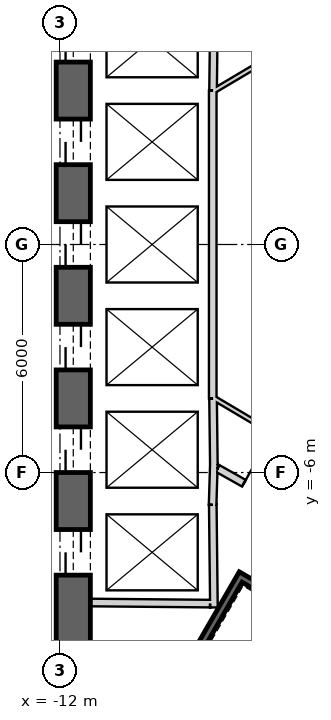
"""IFC4 building model, lengths in metres.
Left out: names, types, materials, properties, quantities, classifications, styles, units other than length and angle.
Written with IfcOpenShell. Run it as: python <this file> out.ifc"""

import sys

from ifc_helpers import new_model, si_unit, direction, frame, frame_2d, origin, place, context, subcontext, project, spatial, rectangle, extrude, element, fill, save


model = new_model("IFC4")
c1 = context("Model", 3, precision=1e-05, world=origin(), true_north=direction((0.0, 1.0)))
c2 = subcontext(c1, "Body", "Model", "MODEL_VIEW")
j1 = project(units=[si_unit("LENGTHUNIT", "METRE"), si_unit("PLANEANGLEUNIT", "RADIAN")], contexts=[c1])
p1 = place(None, origin())
s1 = spatial("IfcSite", under=j1, at=p1, CompositionType="ELEMENT")
p2 = place(p1, origin())
s2 = spatial("IfcBuilding", under=s1, at=p2, CompositionType="ELEMENT")
p3 = place(p2, frame((0.0, 0.0, 70.1)))
s3 = spatial("IfcBuildingStorey", under=s2, at=p3, CompositionType="ELEMENT", Elevation=70.1)
p4 = place(p3, frame((19.475, 2.208, 0.0), z_axis=(0.0, 0.0, 1.0), x_axis=(-0.866028369851, 0.499994862586, 0.0)))
e1 = element("IfcWall", 1, at=p4, inside=s3, PredefinedType="SHEAR", context=c2, shape_type="SweptSolid", body=[
    extrude(rectangle(XDim=31.523, YDim=0.9, at=frame_2d((15.762, 0.0))), origin(), (0.0, 0.0, 1.0), 4.1),
])
p5 = place(p4, frame((7.062, 0.0, 0.0)))
e2 = element("IfcOpeningElement", 2, at=p5, cuts=e1, PredefinedType="OPENING", context=c2, shape_type="SweptSolid", body=[
    extrude(rectangle(XDim=1.2, YDim=2.4, at=frame_2d((0.6, 1.2))), frame((0.0, 0.46, 0.0), z_axis=(0.0, -1.0, 0.0), x_axis=(1.0, 0.0, 0.0)), (0.0, 0.0, 1.0), 0.92),
])
p6 = place(p4, frame((9.762, 0.0, 0.0)))
e3 = element("IfcOpeningElement", 3, at=p6, cuts=e1, PredefinedType="OPENING", context=c2, shape_type="SweptSolid", body=[
    extrude(rectangle(XDim=1.2, YDim=2.4, at=frame_2d((0.6, 1.2))), frame((0.0, 0.46, 0.0), z_axis=(0.0, -1.0, 0.0), x_axis=(1.0, 0.0, 0.0)), (0.0, 0.0, 1.0), 0.92),
])
p7 = place(p4, frame((12.462, 0.0, 0.0)))
e4 = element("IfcOpeningElement", 4, at=p7, cuts=e1, PredefinedType="OPENING", context=c2, shape_type="SweptSolid", body=[
    extrude(rectangle(XDim=1.2, YDim=2.4, at=frame_2d((0.6, 1.2))), frame((0.0, 0.46, 0.0), z_axis=(0.0, -1.0, 0.0), x_axis=(1.0, 0.0, 0.0)), (0.0, 0.0, 1.0), 0.92),
])
p8 = place(p4, frame((15.162, 0.0, 0.0)))
e5 = element("IfcOpeningElement", 5, at=p8, cuts=e1, PredefinedType="OPENING", context=c2, shape_type="SweptSolid", body=[
    extrude(rectangle(XDim=1.2, YDim=2.4, at=frame_2d((0.6, 1.2))), frame((0.0, 0.46, 0.0), z_axis=(0.0, -1.0, 0.0), x_axis=(1.0, 0.0, 0.0)), (0.0, 0.0, 1.0), 0.92),
])
p9 = place(p4, frame((17.862, 0.0, 0.0)))
e6 = element("IfcOpeningElement", 6, at=p9, cuts=e1, PredefinedType="OPENING", context=c2, shape_type="SweptSolid", body=[
    extrude(rectangle(XDim=1.2, YDim=2.4, at=frame_2d((0.6, 1.2))), frame((0.0, 0.46, 0.0), z_axis=(0.0, -1.0, 0.0), x_axis=(1.0, 0.0, 0.0)), (0.0, 0.0, 1.0), 0.92),
])
p10 = place(p4, frame((20.562, 0.0, 0.0)))
e7 = element("IfcOpeningElement", 7, at=p10, cuts=e1, PredefinedType="OPENING", context=c2, shape_type="SweptSolid", body=[
    extrude(rectangle(XDim=1.2, YDim=2.4, at=frame_2d((0.6, 1.2))), frame((0.0, 0.46, 0.0), z_axis=(0.0, -1.0, 0.0), x_axis=(1.0, 0.0, 0.0)), (0.0, 0.0, 1.0), 0.92),
])
p11 = place(p4, frame((23.262, 0.0, 0.0)))
e8 = element("IfcOpeningElement", 8, at=p11, cuts=e1, PredefinedType="OPENING", context=c2, shape_type="SweptSolid", body=[
    extrude(rectangle(XDim=1.2, YDim=2.4, at=frame_2d((0.6, 1.2))), frame((0.0, 0.46, 0.0), z_axis=(0.0, -1.0, 0.0), x_axis=(1.0, 0.0, 0.0)), (0.0, 0.0, 1.0), 0.92),
])
p12 = place(p4, frame((3.612, 0.0, 0.0)))
e9 = element("IfcOpeningElement", 9, at=p12, cuts=e1, PredefinedType="OPENING", context=c2, shape_type="SweptSolid", body=[
    extrude(rectangle(XDim=1.2, YDim=2.4, at=frame_2d((0.6, 1.2))), frame((0.0, 0.46, 0.0), z_axis=(0.0, -1.0, 0.0), x_axis=(1.0, 0.0, 0.0)), (0.0, 0.0, 1.0), 0.92),
])
p13 = place(p4, frame((26.712, 0.0, 0.0)))
e10 = element("IfcOpeningElement", 10, at=p13, cuts=e1, PredefinedType="OPENING", context=c2, shape_type="SweptSolid", body=[
    extrude(rectangle(XDim=1.2, YDim=2.4, at=frame_2d((0.6, 1.2))), frame((0.0, 0.46, 0.0), z_axis=(0.0, -1.0, 0.0), x_axis=(1.0, 0.0, 0.0)), (0.0, 0.0, 1.0), 0.92),
])
p14 = place(p3, frame((-11.65, 15.762, 0.0), z_axis=(0.0, 0.0, 1.0), x_axis=(0.0, -1.0, 0.0)))
e11 = element("IfcWall", 11, at=p14, inside=s3, PredefinedType="SHEAR", context=c2, shape_type="SweptSolid", body=[
    extrude(rectangle(XDim=31.523, YDim=0.9, at=frame_2d((15.762, 0.0))), origin(), (0.0, 0.0, 1.0), 4.1),
])
p15 = place(p14, frame((7.062, 0.0, 0.0)))
e12 = element("IfcOpeningElement", 12, at=p15, cuts=e11, PredefinedType="OPENING", context=c2, shape_type="SweptSolid", body=[
    extrude(rectangle(XDim=1.2, YDim=2.4, at=frame_2d((0.6, 1.2))), frame((0.0, 0.46, 0.0), z_axis=(0.0, -1.0, 0.0), x_axis=(1.0, 0.0, 0.0)), (0.0, 0.0, 1.0), 0.92),
])
p16 = place(p14, frame((9.762, 0.0, 0.0)))
e13 = element("IfcOpeningElement", 13, at=p16, cuts=e11, PredefinedType="OPENING", context=c2, shape_type="SweptSolid", body=[
    extrude(rectangle(XDim=1.2, YDim=2.4, at=frame_2d((0.6, 1.2))), frame((0.0, 0.46, 0.0), z_axis=(0.0, -1.0, 0.0), x_axis=(1.0, 0.0, 0.0)), (0.0, 0.0, 1.0), 0.92),
])
p17 = place(p14, frame((12.462, 0.0, 0.0)))
e14 = element("IfcOpeningElement", 14, at=p17, cuts=e11, PredefinedType="OPENING", context=c2, shape_type="SweptSolid", body=[
    extrude(rectangle(XDim=1.2, YDim=2.4, at=frame_2d((0.6, 1.2))), frame((0.0, 0.46, 0.0), z_axis=(0.0, -1.0, 0.0), x_axis=(1.0, 0.0, 0.0)), (0.0, 0.0, 1.0), 0.92),
])
p18 = place(p14, frame((15.162, 0.0, 0.0)))
e15 = element("IfcOpeningElement", 15, at=p18, cuts=e11, PredefinedType="OPENING", context=c2, shape_type="SweptSolid", body=[
    extrude(rectangle(XDim=1.2, YDim=2.4, at=frame_2d((0.6, 1.2))), frame((0.0, 0.46, 0.0), z_axis=(0.0, -1.0, 0.0), x_axis=(1.0, 0.0, 0.0)), (0.0, 0.0, 1.0), 0.92),
])
p19 = place(p14, frame((17.862, 0.0, 0.0)))
e16 = element("IfcOpeningElement", 16, at=p19, cuts=e11, PredefinedType="OPENING", context=c2, shape_type="SweptSolid", body=[
    extrude(rectangle(XDim=1.2, YDim=2.4, at=frame_2d((0.6, 1.2))), frame((0.0, 0.46, 0.0), z_axis=(0.0, -1.0, 0.0), x_axis=(1.0, 0.0, 0.0)), (0.0, 0.0, 1.0), 0.92),
])
p20 = place(p14, frame((20.562, 0.0, 0.0)))
e17 = element("IfcOpeningElement", 17, at=p20, cuts=e11, PredefinedType="OPENING", context=c2, shape_type="SweptSolid", body=[
    extrude(rectangle(XDim=1.2, YDim=2.4, at=frame_2d((0.6, 1.2))), frame((0.0, 0.46, 0.0), z_axis=(0.0, -1.0, 0.0), x_axis=(1.0, 0.0, 0.0)), (0.0, 0.0, 1.0), 0.92),
])
p21 = place(p14, frame((23.262, 0.0, 0.0)))
e18 = element("IfcOpeningElement", 18, at=p21, cuts=e11, PredefinedType="OPENING", context=c2, shape_type="SweptSolid", body=[
    extrude(rectangle(XDim=1.2, YDim=2.4, at=frame_2d((0.6, 1.2))), frame((0.0, 0.46, 0.0), z_axis=(0.0, -1.0, 0.0), x_axis=(1.0, 0.0, 0.0)), (0.0, 0.0, 1.0), 0.92),
])
p22 = place(p14, frame((3.612, 0.0, 0.0)))
e19 = element("IfcOpeningElement", 19, at=p22, cuts=e11, PredefinedType="OPENING", context=c2, shape_type="SweptSolid", body=[
    extrude(rectangle(XDim=1.2, YDim=2.4, at=frame_2d((0.6, 1.2))), frame((0.0, 0.46, 0.0), z_axis=(0.0, -1.0, 0.0), x_axis=(1.0, 0.0, 0.0)), (0.0, 0.0, 1.0), 0.92),
])
p23 = place(p14, frame((26.712, 0.0, 0.0)))
e20 = element("IfcOpeningElement", 20, at=p23, cuts=e11, PredefinedType="OPENING", context=c2, shape_type="SweptSolid", body=[
    extrude(rectangle(XDim=1.2, YDim=2.4, at=frame_2d((0.6, 1.2))), frame((0.0, 0.46, 0.0), z_axis=(0.0, -1.0, 0.0), x_axis=(1.0, 0.0, 0.0)), (0.0, 0.0, 1.0), 0.92),
])
p24 = place(p3, frame((-7.825, -17.97, 0.0), z_axis=(0.0, 0.0, 1.0), x_axis=(0.866028369851, 0.499994862586, 0.0)))
e21 = element("IfcWall", 21, at=p24, inside=s3, PredefinedType="SHEAR", context=c2, shape_type="SweptSolid", body=[
    extrude(rectangle(XDim=31.523, YDim=0.9, at=frame_2d((15.762, 0.0))), origin(), (0.0, 0.0, 1.0), 4.1),
])
p25 = place(p24, frame((7.062, 0.0, 0.0)))
e22 = element("IfcOpeningElement", 22, at=p25, cuts=e21, PredefinedType="OPENING", context=c2, shape_type="SweptSolid", body=[
    extrude(rectangle(XDim=1.2, YDim=2.4, at=frame_2d((0.6, 1.2))), frame((0.0, 0.46, 0.0), z_axis=(0.0, -1.0, 0.0), x_axis=(1.0, 0.0, 0.0)), (0.0, 0.0, 1.0), 0.92),
])
p26 = place(p24, frame((9.762, 0.0, 0.0)))
e23 = element("IfcOpeningElement", 23, at=p26, cuts=e21, PredefinedType="OPENING", context=c2, shape_type="SweptSolid", body=[
    extrude(rectangle(XDim=1.2, YDim=2.4, at=frame_2d((0.6, 1.2))), frame((0.0, 0.46, 0.0), z_axis=(0.0, -1.0, 0.0), x_axis=(1.0, 0.0, 0.0)), (0.0, 0.0, 1.0), 0.92),
])
p27 = place(p24, frame((12.462, 0.0, 0.0)))
e24 = element("IfcOpeningElement", 24, at=p27, cuts=e21, PredefinedType="OPENING", context=c2, shape_type="SweptSolid", body=[
    extrude(rectangle(XDim=1.2, YDim=2.4, at=frame_2d((0.6, 1.2))), frame((0.0, 0.46, 0.0), z_axis=(0.0, -1.0, 0.0), x_axis=(1.0, 0.0, 0.0)), (0.0, 0.0, 1.0), 0.92),
])
p28 = place(p24, frame((15.162, 0.0, 0.0)))
e25 = element("IfcOpeningElement", 25, at=p28, cuts=e21, PredefinedType="OPENING", context=c2, shape_type="SweptSolid", body=[
    extrude(rectangle(XDim=1.2, YDim=2.4, at=frame_2d((0.6, 1.2))), frame((0.0, 0.46, 0.0), z_axis=(0.0, -1.0, 0.0), x_axis=(1.0, 0.0, 0.0)), (0.0, 0.0, 1.0), 0.92),
])
p29 = place(p24, frame((17.862, 0.0, 0.0)))
e26 = element("IfcOpeningElement", 26, at=p29, cuts=e21, PredefinedType="OPENING", context=c2, shape_type="SweptSolid", body=[
    extrude(rectangle(XDim=1.2, YDim=2.4, at=frame_2d((0.6, 1.2))), frame((0.0, 0.46, 0.0), z_axis=(0.0, -1.0, 0.0), x_axis=(1.0, 0.0, 0.0)), (0.0, 0.0, 1.0), 0.92),
])
p30 = place(p24, frame((20.562, 0.0, 0.0)))
e27 = element("IfcOpeningElement", 27, at=p30, cuts=e21, PredefinedType="OPENING", context=c2, shape_type="SweptSolid", body=[
    extrude(rectangle(XDim=1.2, YDim=2.4, at=frame_2d((0.6, 1.2))), frame((0.0, 0.46, 0.0), z_axis=(0.0, -1.0, 0.0), x_axis=(1.0, 0.0, 0.0)), (0.0, 0.0, 1.0), 0.92),
])
p31 = place(p24, frame((26.712, 0.0, 0.0)))
e28 = element("IfcOpeningElement", 28, at=p31, cuts=e21, PredefinedType="OPENING", context=c2, shape_type="SweptSolid", body=[
    extrude(rectangle(XDim=1.2, YDim=2.4, at=frame_2d((0.6, 1.2))), frame((0.0, 0.46, 0.0), z_axis=(0.0, -1.0, 0.0), x_axis=(1.0, 0.0, 0.0)), (0.0, 0.0, 1.0), 0.92),
])
p32 = place(p24, frame((3.612, 0.0, 0.0)))
e29 = element("IfcOpeningElement", 29, at=p32, cuts=e21, PredefinedType="OPENING", context=c2, shape_type="SweptSolid", body=[
    extrude(rectangle(XDim=1.2, YDim=2.4, at=frame_2d((0.6, 1.2))), frame((0.0, 0.46, 0.0), z_axis=(0.0, -1.0, 0.0), x_axis=(1.0, 0.0, 0.0)), (0.0, 0.0, 1.0), 0.92),
])
p33 = place(p3, frame((-7.949, 5.895, 0.0), z_axis=(0.0, 0.0, 1.0), x_axis=(-0.012042535896, -0.999927486035, 0.0)))
e30 = element("IfcWall", 30, at=p33, inside=s3, PredefinedType="PLUMBINGWALL", context=c2, shape_type="SweptSolid", body=[
    extrude(rectangle(XDim=1.845, YDim=0.2, at=frame_2d((0.922, 0.0))), origin(), (0.0, 0.0, 1.0), 3.8),
])
p34 = place(p3, frame((-7.98, 4.05, 0.0), z_axis=(0.0, 0.0, 1.0), x_axis=(0.0, -1.0, 0.0)))
e31 = element("IfcWall", 31, at=p34, inside=s3, PredefinedType="PLUMBINGWALL", context=c2, shape_type="SweptSolid", body=[
    extrude(rectangle(XDim=8.1, YDim=0.2, at=frame_2d((4.05, 0.0))), origin(), (0.0, 0.0, 1.0), 3.8),
])
p35 = place(p3, frame((-7.95, -5.772, 0.0), z_axis=(0.0, 0.0, 1.0), x_axis=(-0.030803413295, -0.999525462272, 0.0)))
e32 = element("IfcWall", 32, at=p35, inside=s3, PredefinedType="PLUMBINGWALL", context=c2, shape_type="SweptSolid", body=[
    extrude(rectangle(XDim=1.078, YDim=0.2, at=frame_2d((0.539, 0.0))), origin(), (0.0, 0.0, 1.0), 3.8),
])
p36 = place(p3, frame((-7.971, -4.05, 0.0), z_axis=(0.0, 0.0, 1.0), x_axis=(0.012042535896, -0.999927486035, 0.0)))
e33 = element("IfcWall", 33, at=p36, inside=s3, PredefinedType="PLUMBINGWALL", context=c2, shape_type="SweptSolid", body=[
    extrude(rectangle(XDim=1.845, YDim=0.2, at=frame_2d((0.922, 0.0))), origin(), (0.0, 0.0, 1.0), 3.8),
])
p37 = place(p3, frame((-7.979, -6.85, 0.0), z_axis=(0.0, 0.0, 1.0), x_axis=(0.011121475088, -0.999938154483, 0.0)))
e34 = element("IfcWall", 34, at=p37, inside=s3, PredefinedType="PLUMBINGWALL", context=c2, shape_type="SweptSolid", body=[
    extrude(rectangle(XDim=2.7, YDim=0.2, at=frame_2d((1.35, 0.0))), origin(), (0.0, 0.0, 1.0), 3.8),
])
p38 = place(p3, frame((-8.05, -9.449, 0.0), z_axis=(0.0, 0.0, 1.0), x_axis=(-0.999957467379, 0.009222983926, 0.0)))
e35 = element("IfcWall", 35, at=p38, inside=s3, PredefinedType="PLUMBINGWALL", context=c2, shape_type="SweptSolid", body=[
    extrude(rectangle(XDim=3.15, YDim=0.2, at=frame_2d((1.575, 0.0))), origin(), (0.0, 0.0, 1.0), 3.8),
])
p39 = place(p3, frame((-7.196, -8.663, -0.3), z_axis=(0.0, 0.0, 1.0), x_axis=(-0.499997992926, -0.866026562566, 0.0)))
e36 = element("IfcWall", 36, at=p39, inside=s3, PredefinedType="SHEAR", context=c2, shape_type="SweptSolid", body=[
    extrude(rectangle(XDim=7.9, YDim=0.2, at=frame_2d((3.95, 0.0))), origin(), (0.0, 0.0, 1.0), 4.1),
])
p40 = place(p3, frame((-4.041, -10.599, -0.3), z_axis=(0.0, 0.0, 1.0), x_axis=(-0.866047807691, 0.499961193289, 0.0)))
e37 = element("IfcWall", 37, at=p40, inside=s3, PredefinedType="SHEAR", context=c2, shape_type="SweptSolid", body=[
    extrude(rectangle(XDim=3.6, YDim=0.2, at=frame_2d((1.8, 0.0))), origin(), (0.0, 0.0, 1.0), 4.1),
])
p41 = place(p40, frame((1.25, 0.0, 0.3)))
e38 = element("IfcOpeningElement", 38, at=p41, cuts=e37, PredefinedType="OPENING", context=c2, shape_type="SweptSolid", body=[
    extrude(rectangle(XDim=1.1, YDim=2.1, at=frame_2d((0.55, 1.05))), frame((0.0, 0.11, 0.0), z_axis=(0.0, -1.0, 0.0), x_axis=(1.0, 0.0, 0.0)), (0.0, 0.0, 1.0), 0.22),
])
p42 = place(p3, frame((-7.849, -5.894, 0.0), z_axis=(0.0, 0.0, 1.0), x_axis=(0.871363259478, -0.490638431059, 0.0)))
e39 = element("IfcWall", 39, at=p42, inside=s3, PredefinedType="PARTITIONING", context=c2, shape_type="SweptSolid", body=[
    extrude(rectangle(XDim=2.581, YDim=0.2, at=frame_2d((1.291, 0.0))), origin(), (0.0, 0.0, 1.0), 3.8),
])
p43 = place(p42, frame((0.791, 0.0, 0.0)))
e40 = element("IfcOpeningElement", 40, at=p43, cuts=e39, PredefinedType="OPENING", context=c2, shape_type="SweptSolid", body=[
    extrude(rectangle(XDim=1.0, YDim=2.1, at=frame_2d((0.5, 1.05))), frame((0.0, 0.11, 0.0), z_axis=(0.0, -1.0, 0.0), x_axis=(1.0, 0.0, 0.0)), (0.0, 0.0, 1.0), 0.22),
])
p44 = place(p3, frame((-6.037, 5.176, 0.0), z_axis=(0.0, 0.0, 1.0), x_axis=(-0.860106072674, -0.510115225953, 0.0)))
e41 = element("IfcWall", 41, at=p44, inside=s3, PredefinedType="PARTITIONING", context=c2, shape_type="SweptSolid", body=[
    extrude(rectangle(XDim=2.225, YDim=0.12, at=frame_2d((1.112, 0.0))), origin(), (0.0, 0.0, 1.0), 3.8),
])
p45 = place(p3, frame((-7.95, -4.041, 0.0), z_axis=(0.0, 0.0, 1.0), x_axis=(0.860112457103, -0.510104461004, 0.0)))
e42 = element("IfcWall", 42, at=p45, inside=s3, PredefinedType="PARTITIONING", context=c2, shape_type="SweptSolid", body=[
    extrude(rectangle(XDim=2.104, YDim=0.12, at=frame_2d((1.052, 0.0))), origin(), (0.0, 0.0, 1.0), 3.8),
])
p46 = place(p43, origin())
e43 = element("IfcDoor", 43, at=p46, inside=s3, OperationType="SINGLE_SWING_LEFT", PredefinedType="USERDEFINED", context=c2, shape_type="SweptSolid", body=[
    extrude(rectangle(XDim=1.0, YDim=2.1, at=frame_2d((0.5, 1.05))), frame((0.0, 0.025, 0.0), z_axis=(0.0, -1.0, 0.0), x_axis=(1.0, 0.0, 0.0)), (0.0, 0.0, 1.0), 0.05),
])
fill(e40, e43)
p47 = place(p16, origin())
e44 = element("IfcDoor", 44, at=p47, inside=s3, OperationType="SLIDING_TO_LEFT", PredefinedType="USERDEFINED", context=c2, shape_type="SweptSolid", body=[
    extrude(rectangle(XDim=1.2, YDim=2.4, at=frame_2d((0.6, 1.2))), frame((0.0, 0.025, 0.0), z_axis=(0.0, -1.0, 0.0), x_axis=(1.0, 0.0, 0.0)), (0.0, 0.0, 1.0), 0.05),
])
fill(e13, e44)
p48 = place(p17, origin())
e45 = element("IfcDoor", 45, at=p48, inside=s3, OperationType="SLIDING_TO_LEFT", PredefinedType="USERDEFINED", context=c2, shape_type="SweptSolid", body=[
    extrude(rectangle(XDim=1.2, YDim=2.4, at=frame_2d((0.6, 1.2))), frame((0.0, 0.025, 0.0), z_axis=(0.0, -1.0, 0.0), x_axis=(1.0, 0.0, 0.0)), (0.0, 0.0, 1.0), 0.05),
])
fill(e14, e45)
p49 = place(p18, origin())
e46 = element("IfcDoor", 46, at=p49, inside=s3, OperationType="SLIDING_TO_LEFT", PredefinedType="USERDEFINED", context=c2, shape_type="SweptSolid", body=[
    extrude(rectangle(XDim=1.2, YDim=2.4, at=frame_2d((0.6, 1.2))), frame((0.0, 0.025, 0.0), z_axis=(0.0, -1.0, 0.0), x_axis=(1.0, 0.0, 0.0)), (0.0, 0.0, 1.0), 0.05),
])
fill(e15, e46)
p50 = place(p19, origin())
e47 = element("IfcDoor", 47, at=p50, inside=s3, OperationType="SLIDING_TO_LEFT", PredefinedType="USERDEFINED", context=c2, shape_type="SweptSolid", body=[
    extrude(rectangle(XDim=1.2, YDim=2.4, at=frame_2d((0.6, 1.2))), frame((0.0, 0.025, 0.0), z_axis=(0.0, -1.0, 0.0), x_axis=(1.0, 0.0, 0.0)), (0.0, 0.0, 1.0), 0.05),
])
fill(e16, e47)
p51 = place(p20, origin())
e48 = element("IfcDoor", 48, at=p51, inside=s3, OperationType="SLIDING_TO_LEFT", PredefinedType="USERDEFINED", context=c2, shape_type="SweptSolid", body=[
    extrude(rectangle(XDim=1.2, YDim=2.4, at=frame_2d((0.6, 1.2))), frame((0.0, 0.025, 0.0), z_axis=(0.0, -1.0, 0.0), x_axis=(1.0, 0.0, 0.0)), (0.0, 0.0, 1.0), 0.05),
])
fill(e17, e48)
p52 = place(p21, origin())
e49 = element("IfcDoor", 49, at=p52, inside=s3, OperationType="SLIDING_TO_LEFT", PredefinedType="USERDEFINED", context=c2, shape_type="SweptSolid", body=[
    extrude(rectangle(XDim=1.2, YDim=2.4, at=frame_2d((0.6, 1.2))), frame((0.0, 0.025, 0.0), z_axis=(0.0, -1.0, 0.0), x_axis=(1.0, 0.0, 0.0)), (0.0, 0.0, 1.0), 0.05),
])
fill(e18, e49)
save(model, sys.argv[1])
